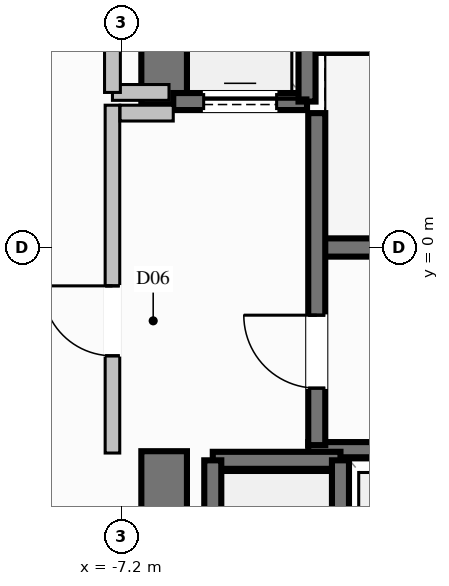
"""IFC4 building model, lengths in metres.
Left out: names, types, materials, properties, quantities, classifications, styles, units other than length and angle.
Written with IfcOpenShell. Run it as: python <this file> out.ifc"""

import sys

from ifc_helpers import new_model, si_unit, direction, frame, frame_2d, origin, place, context, subcontext, project, spatial, rectangle, extrude, element, fill, save


model = new_model("IFC4")
c1 = context("Model", 3, precision=1e-05, world=origin(), true_north=direction((0.0, 1.0)))
c2 = subcontext(c1, "Body", "Model", "MODEL_VIEW")
j1 = project(units=[si_unit("LENGTHUNIT", "METRE"), si_unit("PLANEANGLEUNIT", "RADIAN")], contexts=[c1])
p1 = place(None, origin())
s1 = spatial("IfcSite", under=j1, at=p1, CompositionType="ELEMENT")
p2 = place(p1, origin())
s2 = spatial("IfcBuilding", under=s1, at=p2, CompositionType="ELEMENT")
p3 = place(p2, frame((0.0, 0.0, 28.4)))
s3 = spatial("IfcBuildingStorey", under=s2, at=p3, CompositionType="ELEMENT", Elevation=28.4)
p4 = place(p3, frame((-3.99, 0.0, 0.0), z_axis=(0.0, 0.0, 1.0), x_axis=(1.0, 0.0, 0.0)))
e1 = element("IfcWall", 1, at=p4, inside=s3, PredefinedType="SHEAR", context=c2, shape_type="SweptSolid", body=[
    extrude(rectangle(XDim=7.98, YDim=0.3, at=frame_2d((3.99, 0.0))), origin(), (0.0, 0.0, 1.0), 3.6),
])
for number, where, z_axis, x_axis in (
    (2, (-4.13, -3.325, 0.0), (0.0, 0.0, 1.0), (1.0, 0.0, 0.0)),
    (3, (-4.13, 3.325, 0.0), (0.0, 0.0, 1.0), (1.0, 0.0, 0.0)),
):
    element("IfcWall", number, at=place(p3, frame(where, z_axis=z_axis, x_axis=x_axis)), inside=s3, PredefinedType="SOLIDWALL", context=c2, shape_type="SweptSolid", body=[
        extrude(rectangle(XDim=8.26, YDim=0.25, at=frame_2d((4.13, 0.0))), origin(), (0.0, 0.0, 1.0), 3.6),
    ])
p5 = place(p3, frame((-6.5, 2.35, 0.0), z_axis=(0.0, 0.0, 1.0), x_axis=(0.0, 1.0, 0.0)))
e4 = element("IfcWall", 4, at=p5, inside=s3, PredefinedType="SHEAR", context=c2, shape_type="SweptSolid", body=[
    extrude(rectangle(XDim=4.125, YDim=0.75, at=frame_2d((2.062, 0.0))), origin(), (0.0, 0.0, 1.0), 3.6),
])
p6 = place(p3, frame((-6.5, -6.475, 0.0), z_axis=(0.0, 0.0, 1.0), x_axis=(0.0, 1.0, 0.0)))
e5 = element("IfcWall", 5, at=p6, inside=s3, PredefinedType="SHEAR", context=c2, shape_type="SweptSolid", body=[
    extrude(rectangle(XDim=3.125, YDim=0.75, at=frame_2d((1.562, 0.0))), origin(), (0.0, 0.0, 1.0), 3.6),
])
p7 = place(p3, frame((-3.6, -3.5, 0.0), z_axis=(0.0, 0.0, 1.0), x_axis=(-1.0, 0.0, 0.0)))
e6 = element("IfcWall", 6, at=p7, inside=s3, PredefinedType="SOLIDWALL", context=c2, shape_type="SweptSolid", body=[
    extrude(rectangle(XDim=2.1, YDim=0.28, at=frame_2d((1.05, 0.0))), origin(), (0.0, 0.0, 1.0), 3.34),
])
for number, where, z_axis, x_axis in (
    (7, (-5.7, -3.5, 0.0), (0.0, 0.0, 1.0), (0.0, -1.0, 0.0)),
    (8, (-3.6, -6.0, 0.0), (0.0, 0.0, 1.0), (0.0, 1.0, 0.0)),
):
    element("IfcWall", number, at=place(p3, frame(where, z_axis=z_axis, x_axis=x_axis)), inside=s3, PredefinedType="SOLIDWALL", context=c2, shape_type="SweptSolid", body=[
        extrude(rectangle(XDim=2.5, YDim=0.28, at=frame_2d((1.25, 0.0))), origin(), (0.0, 0.0, 1.0), 3.34),
    ])
p8 = place(p3, frame((-6.35, 2.4, 0.0), z_axis=(0.0, 0.0, 1.0), x_axis=(1.0, 0.0, 0.0)))
e9 = element("IfcWall", 9, at=p8, inside=s3, PredefinedType="SOLIDWALL", context=c2, shape_type="SweptSolid", body=[
    extrude(rectangle(XDim=2.2, YDim=0.28, at=frame_2d((1.1, 0.0))), origin(), (0.0, 0.0, 1.0), 3.34),
])
p9 = place(p8, frame((0.5, 0.0, 0.0)))
e10 = element("IfcOpeningElement", 10, at=p9, cuts=e9, PredefinedType="OPENING", context=c2, shape_type="SweptSolid", body=[
    extrude(rectangle(XDim=1.2, YDim=2.2, at=frame_2d((0.6, 1.1))), frame((0.0, 0.15, 0.0), z_axis=(0.0, -1.0, 0.0), x_axis=(1.0, 0.0, 0.0)), (0.0, 0.0, 1.0), 0.3),
])
p10 = place(p3, frame((-4.15, 2.4, 0.0), z_axis=(0.0, 0.0, 1.0), x_axis=(0.0, 1.0, 0.0)))
e11 = element("IfcWall", 11, at=p10, inside=s3, PredefinedType="SOLIDWALL", context=c2, shape_type="SweptSolid", body=[
    extrude(rectangle(XDim=2.7, YDim=0.28, at=frame_2d((1.35, 0.0))), origin(), (0.0, 0.0, 1.0), 3.34),
])
p11 = place(p3, frame((-3.99, -3.25, 0.0), z_axis=(0.0, 0.0, 1.0), x_axis=(0.0, 1.0, 0.0)))
e12 = element("IfcWall", 12, at=p11, inside=s3, PredefinedType="SOLIDWALL", context=c2, shape_type="SweptSolid", body=[
    extrude(rectangle(XDim=5.46, YDim=0.28, at=frame_2d((2.73, 0.0))), origin(), (0.0, 0.0, 1.0), 3.34),
])
p12 = place(p11, frame((0.937, 0.0, 0.0)))
e13 = element("IfcOpeningElement", 13, at=p12, cuts=e12, PredefinedType="OPENING", context=c2, shape_type="SweptSolid", body=[
    extrude(rectangle(XDim=1.2, YDim=2.2, at=frame_2d((0.6, 1.1))), frame((0.0, 0.15, 0.0), z_axis=(0.0, -1.0, 0.0), x_axis=(1.0, 0.0, 0.0)), (0.0, 0.0, 1.0), 0.3),
])
p13 = place(p3, frame((-7.35, -3.38, 0.0), z_axis=(0.0, 0.0, 1.0), x_axis=(0.0, 1.0, 0.0)))
e14 = element("IfcWall", 14, at=p13, inside=s3, PredefinedType="PARTITIONING", context=c2, shape_type="SweptSolid", body=[
    extrude(rectangle(XDim=5.72, YDim=0.24, at=frame_2d((2.86, 0.0))), origin(), (0.0, 0.0, 1.0), 2.425),
])
p14 = place(p13, frame((1.599, 0.0, 0.0)))
e15 = element("IfcOpeningElement", 15, at=p14, cuts=e14, PredefinedType="OPENING", context=c2, shape_type="SweptSolid", body=[
    extrude(rectangle(XDim=1.15, YDim=2.2, at=frame_2d((0.575, 1.1))), frame((0.0, 0.13, 0.0), z_axis=(0.0, -1.0, 0.0), x_axis=(1.0, 0.0, 0.0)), (0.0, 0.0, 1.0), 0.26),
])
p15 = place(p3, frame((-7.225, 2.21, 0.0), z_axis=(0.0, 0.0, 1.0), x_axis=(1.0, 0.0, 0.0)))
e16 = element("IfcWall", 16, at=p15, inside=s3, PredefinedType="PARTITIONING", context=c2, shape_type="SweptSolid", body=[
    extrude(rectangle(XDim=0.875, YDim=0.26, at=frame_2d((0.438, 0.0))), origin(), (0.0, 0.0, 1.0), 3.34),
])
p16 = place(p3, frame((-7.35, 2.55, 0.0), z_axis=(0.0, 0.0, 1.0), x_axis=(1.0, 0.0, 0.0)))
e17 = element("IfcWall", 17, at=p16, inside=s3, PredefinedType="PARTITIONING", context=c2, shape_type="SweptSolid", body=[
    extrude(rectangle(XDim=0.93, YDim=0.26, at=frame_2d((0.465, 0.0))), origin(), (0.0, 0.0, 1.0), 3.34),
])
p17 = place(p3, frame((-7.35, 2.55, 0.0), z_axis=(0.0, 0.0, 1.0), x_axis=(0.0, 1.0, 0.0)))
e18 = element("IfcWall", 18, at=p17, inside=s3, PredefinedType="PARTITIONING", context=c2, shape_type="SweptSolid", body=[
    extrude(rectangle(XDim=2.4, YDim=0.26, at=frame_2d((1.2, 0.0))), origin(), (0.0, 0.0, 1.0), 2.425),
])
p18 = place(p17, frame((0.775, 0.0, 0.0)))
e19 = element("IfcOpeningElement", 19, at=p18, cuts=e18, PredefinedType="OPENING", context=c2, shape_type="SweptSolid", body=[
    extrude(rectangle(XDim=0.85, YDim=2.05, at=frame_2d((0.425, 1.025))), frame((0.0, 0.14, 0.0), z_axis=(0.0, -1.0, 0.0), x_axis=(1.0, 0.0, 0.0)), (0.0, 0.0, 1.0), 0.28),
])
p19 = place(p9, origin())
e20 = element("IfcDoor", 20, at=p19, inside=s3, OperationType="SLIDING_TO_LEFT", PredefinedType="DOOR", context=c2, shape_type="SweptSolid", body=[
    extrude(rectangle(XDim=1.2, YDim=2.2, at=frame_2d((0.6, 1.1))), frame((0.0, 0.025, 0.0), z_axis=(0.0, -1.0, 0.0), x_axis=(1.0, 0.0, 0.0)), (0.0, 0.0, 1.0), 0.05),
])
fill(e10, e20)
p20 = place(p12, origin())
e21 = element("IfcDoor", 21, at=p20, inside=s3, OperationType="SINGLE_SWING_RIGHT", PredefinedType="DOOR", context=c2, shape_type="SweptSolid", body=[
    extrude(rectangle(XDim=1.2, YDim=2.2, at=frame_2d((0.6, 1.1))), frame((0.0, 0.025, 0.0), z_axis=(0.0, -1.0, 0.0), x_axis=(1.0, 0.0, 0.0)), (0.0, 0.0, 1.0), 0.05),
])
fill(e13, e21)
p21 = place(p14, origin())
e22 = element("IfcDoor", 22, at=p21, inside=s3, OperationType="SINGLE_SWING_RIGHT", PredefinedType="DOOR", context=c2, shape_type="SweptSolid", body=[
    extrude(rectangle(XDim=1.15, YDim=2.2, at=frame_2d((0.575, 1.1))), frame((0.0, 0.025, 0.0), z_axis=(0.0, -1.0, 0.0), x_axis=(1.0, 0.0, 0.0)), (0.0, 0.0, 1.0), 0.05),
])
fill(e15, e22)
save(model, sys.argv[1])
